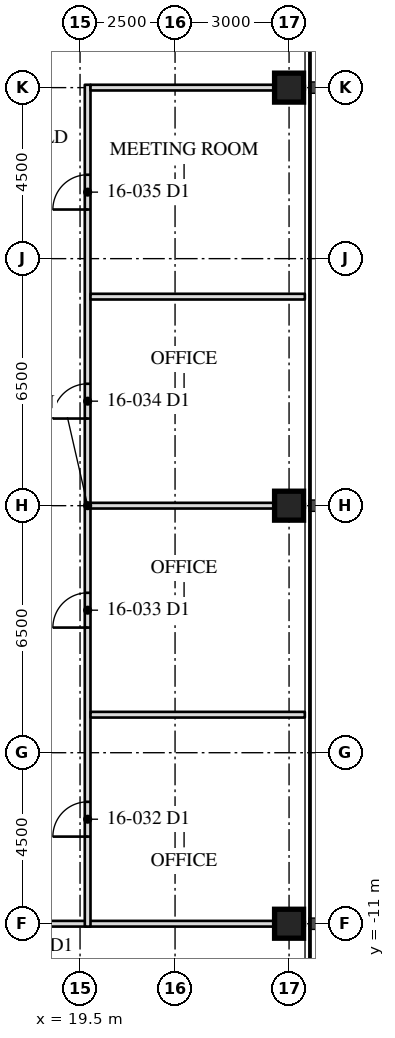
"""IFC4 building model, lengths in metres.
Left out: names, types, materials, properties, quantities, classifications, styles, units other than length and angle.
Written with IfcOpenShell. Run it as: python <this file> out.ifc"""

import sys

from ifc_helpers import new_model, si_unit, direction, frame, frame_2d, origin, origin_2d, place, context, subcontext, project, spatial, rectangle, hollow_rectangle, extrude, element, fill, save


model = new_model("IFC4")
c1 = context("Model", 3, precision=1e-05, world=origin(), true_north=direction((0.0, 1.0)))
c2 = subcontext(c1, "Body", "Model", "MODEL_VIEW")
j1 = project(units=[si_unit("LENGTHUNIT", "METRE"), si_unit("PLANEANGLEUNIT", "RADIAN")], contexts=[c1])
p1 = place(None, origin())
s1 = spatial("IfcSite", under=j1, at=p1, CompositionType="ELEMENT")
p2 = place(p1, origin())
s2 = spatial("IfcBuilding", under=s1, at=p2, CompositionType="ELEMENT")
p3 = place(p2, frame((0.0, 0.0, 69.3)))
s3 = spatial("IfcBuildingStorey", under=s2, at=p3, CompositionType="ELEMENT", Elevation=69.3)
for number, where, z_axis, x_axis in (
    (1, (25.0, -11.0, 0.0), (0.0, 0.0, 1.0), (0.0, 1.0, 0.0)),
    (2, (25.0, 0.0, 0.0), (0.0, 0.0, 1.0), (0.0, 1.0, 0.0)),
    (3, (25.0, 11.0, 0.0), (0.0, 0.0, 1.0), (0.0, 1.0, 0.0)),
):
    element("IfcColumn", number, at=place(p3, frame(where, z_axis=z_axis, x_axis=x_axis)), inside=s3, PredefinedType="COLUMN", context=c2, shape_type="SweptSolid", body=[
        extrude(hollow_rectangle(XDim=0.762, YDim=0.762, WallThickness=0.127, at=origin_2d()), origin(), (0.0, 0.0, 1.0), 4.1),
    ])
p4 = place(p3, frame((11.75, -11.0, 0.0), z_axis=(0.0, 0.0, 1.0), x_axis=(1.0, 0.0, 0.0)))
e4 = element("IfcWall", 4, at=p4, inside=s3, PredefinedType="PARTITIONING", context=c2, shape_type="SweptSolid", body=[
    extrude(rectangle(XDim=13.665, YDim=0.15, at=frame_2d((6.833, 0.0))), origin(), (0.0, 0.0, 1.0), 3.13),
])
p5 = place(p4, frame((6.018, 0.0, 0.0)))
e5 = element("IfcOpeningElement", 5, at=p5, cuts=e4, PredefinedType="OPENING", context=c2, shape_type="SweptSolid", body=[
    extrude(rectangle(XDim=0.915, YDim=2.134, at=frame_2d((0.458, 1.067))), frame((0.0, 0.085, 0.0), z_axis=(0.0, -1.0, 0.0), x_axis=(1.0, 0.0, 0.0)), (0.0, 0.0, 1.0), 0.17),
])
p6 = place(p3, frame((19.7, -11.075, 0.0), z_axis=(0.0, 0.0, 1.0), x_axis=(0.0, 1.0, 0.0)))
e6 = element("IfcWall", 6, at=p6, inside=s3, PredefinedType="PARTITIONING", context=c2, shape_type="SweptSolid", body=[
    extrude(rectangle(XDim=22.15, YDim=0.15, at=frame_2d((11.075, 0.0))), origin(), (0.0, 0.0, 1.0), 3.91),
])
p7 = place(p6, frame((2.367, 0.0, 0.0)))
e7 = element("IfcOpeningElement", 7, at=p7, cuts=e6, PredefinedType="OPENING", context=c2, shape_type="SweptSolid", body=[
    extrude(rectangle(XDim=0.915, YDim=2.134, at=frame_2d((0.458, 1.067))), frame((0.0, 0.085, 0.0), z_axis=(0.0, -1.0, 0.0), x_axis=(1.0, 0.0, 0.0)), (0.0, 0.0, 1.0), 0.17),
])
p8 = place(p6, frame((7.867, 0.0, 0.0)))
e8 = element("IfcOpeningElement", 8, at=p8, cuts=e6, PredefinedType="OPENING", context=c2, shape_type="SweptSolid", body=[
    extrude(rectangle(XDim=0.915, YDim=2.134, at=frame_2d((0.458, 1.067))), frame((0.0, 0.085, 0.0), z_axis=(0.0, -1.0, 0.0), x_axis=(1.0, 0.0, 0.0)), (0.0, 0.0, 1.0), 0.17),
])
p9 = place(p6, frame((13.367, 0.0, 0.0)))
e9 = element("IfcOpeningElement", 9, at=p9, cuts=e6, PredefinedType="OPENING", context=c2, shape_type="SweptSolid", body=[
    extrude(rectangle(XDim=0.915, YDim=2.134, at=frame_2d((0.458, 1.067))), frame((0.0, 0.085, 0.0), z_axis=(0.0, -1.0, 0.0), x_axis=(1.0, 0.0, 0.0)), (0.0, 0.0, 1.0), 0.17),
])
p10 = place(p6, frame((18.867, 0.0, 0.0)))
e10 = element("IfcOpeningElement", 10, at=p10, cuts=e6, PredefinedType="OPENING", context=c2, shape_type="SweptSolid", body=[
    extrude(rectangle(XDim=0.915, YDim=2.134, at=frame_2d((0.458, 1.067))), frame((0.0, 0.085, 0.0), z_axis=(0.0, -1.0, 0.0), x_axis=(1.0, 0.0, 0.0)), (0.0, 0.0, 1.0), 0.17),
])
p11 = place(p3, frame((19.775, -5.5, 0.0), z_axis=(0.0, 0.0, 1.0), x_axis=(1.0, 0.0, 0.0)))
e11 = element("IfcWall", 11, at=p11, inside=s3, PredefinedType="PARTITIONING", context=c2, shape_type="SweptSolid", body=[
    extrude(rectangle(XDim=5.64, YDim=0.15, at=frame_2d((2.82, 0.0))), origin(), (0.0, 0.0, 1.0), 3.91),
])
p12 = place(p3, frame((19.775, 0.0, 0.0), z_axis=(0.0, 0.0, 1.0), x_axis=(1.0, 0.0, 0.0)))
e12 = element("IfcWall", 12, at=p12, inside=s3, PredefinedType="PARTITIONING", context=c2, shape_type="SweptSolid", body=[
    extrude(rectangle(XDim=5.64, YDim=0.15, at=frame_2d((2.82, 0.0))), origin(), (0.0, 0.0, 1.0), 3.13),
])
p13 = place(p3, frame((19.775, 5.5, 0.0), z_axis=(0.0, 0.0, 1.0), x_axis=(1.0, 0.0, 0.0)))
e13 = element("IfcWall", 13, at=p13, inside=s3, PredefinedType="PARTITIONING", context=c2, shape_type="SweptSolid", body=[
    extrude(rectangle(XDim=5.64, YDim=0.15, at=frame_2d((2.82, 0.0))), origin(), (0.0, 0.0, 1.0), 3.91),
])
p14 = place(p3, frame((19.775, 11.0, 0.0), z_axis=(0.0, 0.0, 1.0), x_axis=(1.0, 0.0, 0.0)))
e14 = element("IfcWall", 14, at=p14, inside=s3, PredefinedType="PARTITIONING", context=c2, shape_type="SweptSolid", body=[
    extrude(rectangle(XDim=5.64, YDim=0.15, at=frame_2d((2.82, 0.0))), origin(), (0.0, 0.0, 1.0), 3.13),
])
p15 = place(p7, origin())
e15 = element("IfcDoor", 15, at=p15, inside=s3, OperationType="SINGLE_SWING_LEFT", PredefinedType="DOOR", context=c2, shape_type="SweptSolid", body=[
    extrude(rectangle(XDim=0.915, YDim=2.134, at=frame_2d((0.458, 1.067))), frame((0.0, 0.025, 0.0), z_axis=(0.0, -1.0, 0.0), x_axis=(1.0, 0.0, 0.0)), (0.0, 0.0, 1.0), 0.05),
])
fill(e7, e15)
p16 = place(p8, origin())
e16 = element("IfcDoor", 16, at=p16, inside=s3, OperationType="SINGLE_SWING_LEFT", PredefinedType="DOOR", context=c2, shape_type="SweptSolid", body=[
    extrude(rectangle(XDim=0.915, YDim=2.134, at=frame_2d((0.458, 1.067))), frame((0.0, 0.025, 0.0), z_axis=(0.0, -1.0, 0.0), x_axis=(1.0, 0.0, 0.0)), (0.0, 0.0, 1.0), 0.05),
])
fill(e8, e16)
p17 = place(p9, origin())
e17 = element("IfcDoor", 17, at=p17, inside=s3, OperationType="SINGLE_SWING_LEFT", PredefinedType="DOOR", context=c2, shape_type="SweptSolid", body=[
    extrude(rectangle(XDim=0.915, YDim=2.134, at=frame_2d((0.458, 1.067))), frame((0.0, 0.025, 0.0), z_axis=(0.0, -1.0, 0.0), x_axis=(1.0, 0.0, 0.0)), (0.0, 0.0, 1.0), 0.05),
])
fill(e9, e17)
p18 = place(p10, origin())
e18 = element("IfcDoor", 18, at=p18, inside=s3, OperationType="SINGLE_SWING_LEFT", PredefinedType="DOOR", context=c2, shape_type="SweptSolid", body=[
    extrude(rectangle(XDim=0.915, YDim=2.134, at=frame_2d((0.458, 1.067))), frame((0.0, 0.025, 0.0), z_axis=(0.0, -1.0, 0.0), x_axis=(1.0, 0.0, 0.0)), (0.0, 0.0, 1.0), 0.05),
])
fill(e10, e18)
save(model, sys.argv[1])
